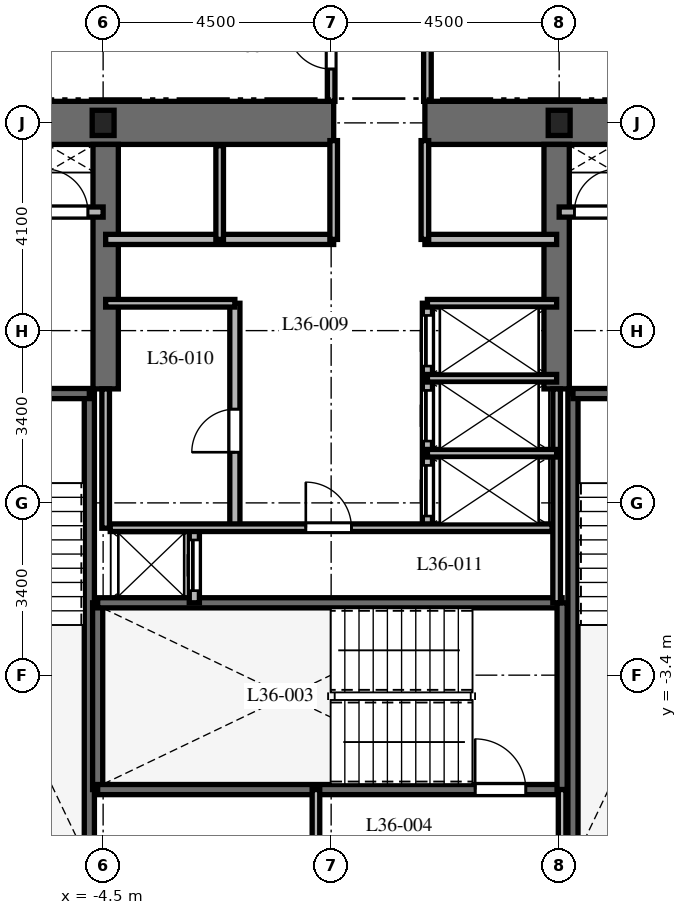
"""IFC4 building model, lengths in metres.
Left out: names, types, materials, properties, quantities, classifications, styles, units other than length and angle.
Written with IfcOpenShell. Run it as: python <this file> out.ifc"""

import sys

from ifc_helpers import new_model, si_unit, direction, frame, frame_2d, origin, origin_2d, place, context, subcontext, project, spatial, rectangle, i_section, extrude, element, fill, save


model = new_model("IFC4")
c1 = context("Model", 3, precision=1e-05, world=origin(), true_north=direction((0.0, 1.0)))
c2 = subcontext(c1, "Body", "Model", "MODEL_VIEW")
j1 = project(units=[si_unit("LENGTHUNIT", "METRE"), si_unit("PLANEANGLEUNIT", "RADIAN")], contexts=[c1])
p1 = place(None, origin())
s1 = spatial("IfcSite", under=j1, at=p1, CompositionType="ELEMENT")
p2 = place(p1, origin())
s2 = spatial("IfcBuilding", under=s1, at=p2, CompositionType="ELEMENT")
p3 = place(p2, frame((0.0, 0.0, 148.0)))
s3 = spatial("IfcBuildingStorey", under=s2, at=p3, CompositionType="ELEMENT", Elevation=148.0)
p4 = place(p3, frame((-9.425, 7.5, 0.0), z_axis=(0.0, 0.0, 1.0), x_axis=(1.0, 0.0, 0.0)))
e1 = element("IfcWall", 1, at=p4, inside=s3, PredefinedType="SHEAR", context=c2, shape_type="SweptSolid", body=[
    extrude(rectangle(XDim=9.475, YDim=0.85, at=frame_2d((4.738, 0.0))), origin(), (0.0, 0.0, 1.0), 3.7),
])
p5 = place(p3, frame((1.85, 7.5, 0.0), z_axis=(0.0, 0.0, 1.0), x_axis=(1.0, 0.0, 0.0)))
e2 = element("IfcWall", 2, at=p5, inside=s3, PredefinedType="SHEAR", context=c2, shape_type="SweptSolid", body=[
    extrude(rectangle(XDim=7.575, YDim=0.85, at=frame_2d((3.788, 0.0))), origin(), (0.0, 0.0, 1.0), 3.7),
])
for number, where, z_axis, x_axis in (
    (3, (-4.45, 2.25, 0.0), (0.0, 0.0, 1.0), (0.0, 1.0, 0.0)),
    (4, (4.45, 2.25, 0.0), (0.0, 0.0, 1.0), (0.0, 1.0, 0.0)),
):
    element("IfcWall", number, at=place(p3, frame(where, z_axis=z_axis, x_axis=x_axis)), inside=s3, PredefinedType="SHEAR", context=c2, shape_type="SweptSolid", body=[
        extrude(rectangle(XDim=4.825, YDim=0.5, at=frame_2d((2.413, 0.0))), origin(), (0.0, 0.0, 1.0), 3.7),
    ])
p6 = place(p3, frame((-4.772, -6.985, 0.0), z_axis=(0.0, 0.0, 1.0), x_axis=(0.0, 1.0, 0.0)))
e5 = element("IfcWall", 5, at=p6, inside=s3, PredefinedType="SHEAR", context=c2, shape_type="SweptSolid", body=[
    extrude(rectangle(XDim=9.143, YDim=0.2, at=frame_2d((4.572, 0.0))), origin(), (0.0, 0.0, 1.0), 3.7),
])
p7 = place(p3, frame((-8.458, 2.158, 0.0), z_axis=(0.0, 0.0, 1.0), x_axis=(1.0, 0.0, 0.0)))
e6 = element("IfcWall", 6, at=p7, inside=s3, PredefinedType="SHEAR", context=c2, shape_type="SweptSolid", body=[
    extrude(rectangle(XDim=3.686, YDim=0.2, at=frame_2d((1.843, 0.0))), origin(), (0.0, 0.0, 1.0), 3.7),
])
p8 = place(p7, frame((1.3, 0.0, 0.0)))
e7 = element("IfcOpeningElement", 7, at=p8, cuts=e6, PredefinedType="OPENING", context=c2, shape_type="SweptSolid", body=[
    extrude(rectangle(XDim=1.0, YDim=2.15, at=frame_2d((0.5, 1.075))), frame((0.0, 0.11, 0.0), z_axis=(0.0, -1.0, 0.0), x_axis=(1.0, 0.0, 0.0)), (0.0, 0.0, 1.0), 0.22),
])
p9 = place(p3, frame((4.772, -6.985, 0.0), z_axis=(0.0, 0.0, 1.0), x_axis=(0.0, 1.0, 0.0)))
e8 = element("IfcWall", 8, at=p9, inside=s3, PredefinedType="SHEAR", context=c2, shape_type="SweptSolid", body=[
    extrude(rectangle(XDim=9.143, YDim=0.2, at=frame_2d((4.572, 0.0))), origin(), (0.0, 0.0, 1.0), 3.7),
])
p10 = place(p3, frame((4.772, 2.158, 0.0), z_axis=(0.0, 0.0, 1.0), x_axis=(1.0, 0.0, 0.0)))
e9 = element("IfcWall", 9, at=p10, inside=s3, PredefinedType="SHEAR", context=c2, shape_type="SweptSolid", body=[
    extrude(rectangle(XDim=3.686, YDim=0.2, at=frame_2d((1.843, 0.0))), origin(), (0.0, 0.0, 1.0), 3.7),
])
p11 = place(p10, frame((1.35, 0.0, 0.0)))
e10 = element("IfcOpeningElement", 10, at=p11, cuts=e9, PredefinedType="OPENING", context=c2, shape_type="SweptSolid", body=[
    extrude(rectangle(XDim=1.0, YDim=2.15, at=frame_2d((0.5, 1.075))), frame((0.0, 0.11, 0.0), z_axis=(0.0, -1.0, 0.0), x_axis=(1.0, 0.0, 0.0)), (0.0, 0.0, 1.0), 0.22),
])
p12 = place(p3, frame((-4.608, -5.658, 0.0), z_axis=(0.0, 0.0, 1.0), x_axis=(0.0, 1.0, 0.0)))
e11 = element("IfcWall", 11, at=p12, inside=s3, PredefinedType="SHEAR", context=c2, shape_type="SweptSolid", body=[
    extrude(rectangle(XDim=3.686, YDim=0.2, at=frame_2d((1.843, 0.0))), origin(), (0.0, 0.0, 1.0), 3.7),
])
p13 = place(p3, frame((-4.608, -5.658, 0.0), z_axis=(0.0, 0.0, 1.0), x_axis=(1.0, 0.0, 0.0)))
e12 = element("IfcWall", 12, at=p13, inside=s3, PredefinedType="SHEAR", context=c2, shape_type="SweptSolid", body=[
    extrude(rectangle(XDim=9.166, YDim=0.2, at=frame_2d((4.583, 0.0))), origin(), (0.0, 0.0, 1.0), 3.7),
])
p14 = place(p13, frame((7.45, 0.0, 0.0)))
e13 = element("IfcOpeningElement", 13, at=p14, cuts=e12, PredefinedType="OPENING", context=c2, shape_type="SweptSolid", body=[
    extrude(rectangle(XDim=1.0, YDim=2.15, at=frame_2d((0.5, 1.075))), frame((0.0, 0.11, 0.0), z_axis=(0.0, -1.0, 0.0), x_axis=(1.0, 0.0, 0.0)), (0.0, 0.0, 1.0), 0.22),
])
p15 = place(p3, frame((-4.608, -1.972, 0.0), z_axis=(0.0, 0.0, 1.0), x_axis=(1.0, 0.0, 0.0)))
e14 = element("IfcWall", 14, at=p15, inside=s3, PredefinedType="SHEAR", context=c2, shape_type="SweptSolid", body=[
    extrude(rectangle(XDim=9.166, YDim=0.2, at=frame_2d((4.583, 0.0))), origin(), (0.0, 0.0, 1.0), 3.7),
])
p16 = place(p3, frame((4.558, -5.658, 0.0), z_axis=(0.0, 0.0, 1.0), x_axis=(0.0, 1.0, 0.0)))
e15 = element("IfcWall", 15, at=p16, inside=s3, PredefinedType="SHEAR", context=c2, shape_type="SweptSolid", body=[
    extrude(rectangle(XDim=3.686, YDim=0.2, at=frame_2d((1.843, 0.0))), origin(), (0.0, 0.0, 1.0), 3.7),
])
for number, where, z_axis, x_axis in (
    (16, (4.5, 7.5, 0.0), (0.0, 0.0, 1.0), (1.0, 0.0, 0.0)),
    (17, (-4.5, 7.5, 0.0), (0.0, 0.0, 1.0), (1.0, 0.0, 0.0)),
):
    element("IfcColumn", number, at=place(p3, frame(where, z_axis=z_axis, x_axis=x_axis)), inside=s3, PredefinedType="COLUMN", context=c2, shape_type="SweptSolid", body=[
        extrude(i_section(OverallWidth=0.432, OverallDepth=0.498, WebThickness=0.056, FlangeThickness=0.089, at=origin_2d()), origin(), (0.0, 0.0, 1.0), 3.7),
    ])
for number, where, z_axis, x_axis in (
    (18, (-0.3, -7.02, 0.0), (0.0, 0.0, 1.0), (0.0, 1.0, 0.0)),
    (19, (4.558, -7.02, 0.0), (0.0, 0.0, 1.0), (0.0, 1.0, 0.0)),
):
    element("IfcWall", number, at=place(p3, frame(where, z_axis=z_axis, x_axis=x_axis)), inside=s3, PredefinedType="PARTITIONING", context=c2, shape_type="SweptSolid", body=[
        extrude(rectangle(XDim=1.362, YDim=0.15, at=frame_2d((0.681, 0.0))), origin(), (0.0, 0.0, 1.0), 3.4),
    ])
p17 = place(p3, frame((-8.55, 5.74, 0.0), z_axis=(0.0, 0.0, 1.0), x_axis=(1.0, 0.0, 0.0)))
e20 = element("IfcWall", 20, at=p17, inside=s3, PredefinedType="PARTITIONING", context=c2, shape_type="SweptSolid", body=[
    extrude(rectangle(XDim=4.05, YDim=0.2, at=frame_2d((2.025, 0.0))), origin(), (0.0, 0.0, 1.0), 3.4),
])
p18 = place(p17, frame((0.75, 0.0, 0.0)))
e21 = element("IfcOpeningElement", 21, at=p18, cuts=e20, PredefinedType="OPENING", context=c2, shape_type="SweptSolid", body=[
    extrude(rectangle(XDim=1.1, YDim=2.2, at=frame_2d((0.55, 1.1))), frame((0.0, 0.11, 0.0), z_axis=(0.0, -1.0, 0.0), x_axis=(1.0, 0.0, 0.0)), (0.0, 0.0, 1.0), 0.22),
])
p19 = place(p17, frame((2.9, 0.0, 0.0)))
e22 = element("IfcOpeningElement", 22, at=p19, cuts=e20, PredefinedType="OPENING", context=c2, shape_type="SweptSolid", body=[
    extrude(rectangle(XDim=0.85, YDim=2.03, at=frame_2d((0.425, 1.015))), frame((0.0, 0.11, 0.0), z_axis=(0.0, -1.0, 0.0), x_axis=(1.0, 0.0, 0.0)), (0.0, 0.0, 1.0), 0.22),
])
p20 = place(p3, frame((4.5, 5.74, 0.0), z_axis=(0.0, 0.0, 1.0), x_axis=(1.0, 0.0, 0.0)))
e23 = element("IfcWall", 23, at=p20, inside=s3, PredefinedType="PARTITIONING", context=c2, shape_type="SweptSolid", body=[
    extrude(rectangle(XDim=4.05, YDim=0.2, at=frame_2d((2.025, 0.0))), origin(), (0.0, 0.0, 1.0), 3.4),
])
p21 = place(p20, frame((0.3, 0.0, 0.0)))
e24 = element("IfcOpeningElement", 24, at=p21, cuts=e23, PredefinedType="OPENING", context=c2, shape_type="SweptSolid", body=[
    extrude(rectangle(XDim=0.85, YDim=2.03, at=frame_2d((0.425, 1.015))), frame((0.0, 0.11, 0.0), z_axis=(0.0, -1.0, 0.0), x_axis=(1.0, 0.0, 0.0)), (0.0, 0.0, 1.0), 0.22),
])
p22 = place(p20, frame((2.15, 0.0, 0.0)))
e25 = element("IfcOpeningElement", 25, at=p22, cuts=e23, PredefinedType="OPENING", context=c2, shape_type="SweptSolid", body=[
    extrude(rectangle(XDim=1.1, YDim=2.2, at=frame_2d((0.55, 1.1))), frame((0.0, 0.11, 0.0), z_axis=(0.0, -1.0, 0.0), x_axis=(1.0, 0.0, 0.0)), (0.0, 0.0, 1.0), 0.22),
])
p23 = place(p3, frame((-2.7, -1.972, 0.0), z_axis=(0.0, 0.0, 1.0), x_axis=(0.0, 1.0, 0.0)))
e26 = element("IfcWall", 26, at=p23, inside=s3, PredefinedType="PARTITIONING", context=c2, shape_type="SweptSolid", body=[
    extrude(rectangle(XDim=1.472, YDim=0.2, at=frame_2d((0.736, 0.0))), origin(), (0.0, 0.0, 1.0), 3.4),
])
p24 = place(p23, frame((0.24, 0.0, 0.0)))
e27 = element("IfcOpeningElement", 27, at=p24, cuts=e26, PredefinedType="OPENING", context=c2, shape_type="SweptSolid", body=[
    extrude(rectangle(XDim=1.0, YDim=2.2, at=frame_2d((0.5, 1.1))), frame((0.0, 0.11, 0.0), z_axis=(0.0, -1.0, 0.0), x_axis=(1.0, 0.0, 0.0)), (0.0, 0.0, 1.0), 0.22),
])
p25 = place(p3, frame((-4.45, 5.2, 0.0), z_axis=(0.0, 0.0, 1.0), x_axis=(1.0, 0.0, 0.0)))
e28 = element("IfcWall", 28, at=p25, inside=s3, PredefinedType="PARTITIONING", context=c2, shape_type="SweptSolid", body=[
    extrude(rectangle(XDim=4.5, YDim=0.2, at=frame_2d((2.25, 0.0))), origin(), (0.0, 0.0, 1.0), 3.4),
])
p26 = place(p3, frame((1.85, 5.2, 0.0), z_axis=(0.0, 0.0, 1.0), x_axis=(1.0, 0.0, 0.0)))
e29 = element("IfcWall", 29, at=p26, inside=s3, PredefinedType="PARTITIONING", context=c2, shape_type="SweptSolid", body=[
    extrude(rectangle(XDim=2.6, YDim=0.2, at=frame_2d((1.3, 0.0))), origin(), (0.0, 0.0, 1.0), 3.4),
])
p27 = place(p3, frame((-2.2, 5.2, 0.0), z_axis=(0.0, 0.0, 1.0), x_axis=(0.0, 1.0, 0.0)))
e30 = element("IfcWall", 30, at=p27, inside=s3, PredefinedType="PARTITIONING", context=c2, shape_type="SweptSolid", body=[
    extrude(rectangle(XDim=1.85, YDim=0.15, at=frame_2d((0.925, 0.0))), origin(), (0.0, 0.0, 1.0), 3.4),
])
for number, where, z_axis, x_axis in (
    (31, (0.05, 5.2, 0.0), (0.0, 0.0, 1.0), (0.0, 1.0, 0.0)),
    (32, (1.85, 5.2, 0.0), (0.0, 0.0, 1.0), (0.0, 1.0, 0.0)),
):
    element("IfcWall", number, at=place(p3, frame(where, z_axis=z_axis, x_axis=x_axis)), inside=s3, PredefinedType="PARTITIONING", context=c2, shape_type="SweptSolid", body=[
        extrude(rectangle(XDim=1.95, YDim=0.15, at=frame_2d((0.975, 0.0))), origin(), (0.0, 0.0, 1.0), 3.4),
    ])
p28 = place(p3, frame((-4.45, -0.5, 0.0), z_axis=(0.0, 0.0, 1.0), x_axis=(0.0, 1.0, 0.0)))
e33 = element("IfcWall", 33, at=p28, inside=s3, PredefinedType="PARTITIONING", context=c2, shape_type="SweptSolid", body=[
    extrude(rectangle(XDim=2.75, YDim=0.15, at=frame_2d((1.375, 0.0))), origin(), (0.0, 0.0, 1.0), 3.4),
])
p29 = place(p3, frame((4.45, -1.972, 0.0), z_axis=(0.0, 0.0, 1.0), x_axis=(0.0, 1.0, 0.0)))
e34 = element("IfcWall", 34, at=p29, inside=s3, PredefinedType="PARTITIONING", context=c2, shape_type="SweptSolid", body=[
    extrude(rectangle(XDim=4.222, YDim=0.15, at=frame_2d((2.111, 0.0))), origin(), (0.0, 0.0, 1.0), 3.4),
])
p30 = place(p3, frame((-1.9, -0.5, 0.0), z_axis=(0.0, 0.0, 1.0), x_axis=(0.0, 1.0, 0.0)))
e35 = element("IfcWall", 35, at=p30, inside=s3, PredefinedType="PARTITIONING", context=c2, shape_type="SweptSolid", body=[
    extrude(rectangle(XDim=4.44, YDim=0.2, at=frame_2d((2.22, 0.0))), origin(), (0.0, 0.0, 1.0), 3.4),
])
p31 = place(p30, frame((1.5, 0.0, 0.0)))
e36 = element("IfcOpeningElement", 36, at=p31, cuts=e35, PredefinedType="OPENING", context=c2, shape_type="SweptSolid", body=[
    extrude(rectangle(XDim=0.85, YDim=2.03, at=frame_2d((0.425, 1.015))), frame((0.0, 0.11, 0.0), z_axis=(0.0, -1.0, 0.0), x_axis=(1.0, 0.0, 0.0)), (0.0, 0.0, 1.0), 0.22),
])
p32 = place(p3, frame((-4.45, 3.94, 0.0), z_axis=(0.0, 0.0, 1.0), x_axis=(1.0, 0.0, 0.0)))
e37 = element("IfcWall", 37, at=p32, inside=s3, PredefinedType="PARTITIONING", context=c2, shape_type="SweptSolid", body=[
    extrude(rectangle(XDim=2.55, YDim=0.15, at=frame_2d((1.275, 0.0))), origin(), (0.0, 0.0, 1.0), 3.4),
])
p33 = place(p3, frame((1.9, -0.5, 0.0), z_axis=(0.0, 0.0, 1.0), x_axis=(0.0, 1.0, 0.0)))
e38 = element("IfcWall", 38, at=p33, inside=s3, PredefinedType="PARTITIONING", context=c2, shape_type="SweptSolid", body=[
    extrude(rectangle(XDim=4.44, YDim=0.2, at=frame_2d((2.22, 0.0))), origin(), (0.0, 0.0, 1.0), 3.4),
])
p34 = place(p33, frame((0.24, 0.0, 0.0)))
e39 = element("IfcOpeningElement", 39, at=p34, cuts=e38, PredefinedType="OPENING", context=c2, shape_type="SweptSolid", body=[
    extrude(rectangle(XDim=1.0, YDim=2.2, at=frame_2d((0.5, 1.1))), frame((0.0, 0.11, 0.0), z_axis=(0.0, -1.0, 0.0), x_axis=(1.0, 0.0, 0.0)), (0.0, 0.0, 1.0), 0.22),
])
p35 = place(p33, frame((1.72, 0.0, 0.0)))
e40 = element("IfcOpeningElement", 40, at=p35, cuts=e38, PredefinedType="OPENING", context=c2, shape_type="SweptSolid", body=[
    extrude(rectangle(XDim=1.0, YDim=2.2, at=frame_2d((0.5, 1.1))), frame((0.0, 0.11, 0.0), z_axis=(0.0, -1.0, 0.0), x_axis=(1.0, 0.0, 0.0)), (0.0, 0.0, 1.0), 0.22),
])
p36 = place(p33, frame((3.2, 0.0, 0.0)))
e41 = element("IfcOpeningElement", 41, at=p36, cuts=e38, PredefinedType="OPENING", context=c2, shape_type="SweptSolid", body=[
    extrude(rectangle(XDim=1.0, YDim=2.2, at=frame_2d((0.5, 1.1))), frame((0.0, 0.11, 0.0), z_axis=(0.0, -1.0, 0.0), x_axis=(1.0, 0.0, 0.0)), (0.0, 0.0, 1.0), 0.22),
])
for number, where, z_axis, x_axis in (
    (42, (1.9, 3.94, 0.0), (0.0, 0.0, 1.0), (1.0, 0.0, 0.0)),
    (43, (1.9, 0.98, 0.0), (0.0, 0.0, 1.0), (1.0, 0.0, 0.0)),
    (44, (1.9, 2.46, 0.0), (0.0, 0.0, 1.0), (1.0, 0.0, 0.0)),
):
    element("IfcWall", number, at=place(p3, frame(where, z_axis=z_axis, x_axis=x_axis)), inside=s3, PredefinedType="PARTITIONING", context=c2, shape_type="SweptSolid", body=[
        extrude(rectangle(XDim=2.55, YDim=0.15, at=frame_2d((1.275, 0.0))), origin(), (0.0, 0.0, 1.0), 3.4),
    ])
p37 = place(p3, frame((-4.36, -0.49, 0.0), z_axis=(0.0, 0.0, 1.0), x_axis=(1.0, 0.0, 0.0)))
e45 = element("IfcWall", 45, at=p37, inside=s3, PredefinedType="PARTITIONING", context=c2, shape_type="SweptSolid", body=[
    extrude(rectangle(XDim=8.72, YDim=0.15, at=frame_2d((4.36, 0.0))), origin(), (0.0, 0.0, 1.0), 3.4),
])
p38 = place(p37, frame((3.86, 0.0, 0.0)))
e46 = element("IfcOpeningElement", 46, at=p38, cuts=e45, PredefinedType="OPENING", context=c2, shape_type="SweptSolid", body=[
    extrude(rectangle(XDim=0.9, YDim=2.03, at=frame_2d((0.45, 1.015))), frame((0.0, 0.085, 0.0), z_axis=(0.0, -1.0, 0.0), x_axis=(1.0, 0.0, 0.0)), (0.0, 0.0, 1.0), 0.17),
])
p39 = place(p3, frame((1.9, 10.05, 0.0), z_axis=(0.0, 0.0, 1.0), x_axis=(0.0, -1.0, 0.0)))
e47 = element("IfcWall", 47, at=p39, inside=s3, PredefinedType="PARTITIONING", context=c2, shape_type="SweptSolid", body=[
    extrude(rectangle(XDim=2.125, YDim=0.15, at=frame_2d((1.062, 0.0))), origin(), (0.0, 0.0, 1.0), 3.4),
])
p40 = place(p3, frame((0.0, 7.925, 0.0), z_axis=(0.0, 0.0, 1.0), x_axis=(0.0, 1.0, 0.0)))
e48 = element("IfcWall", 48, at=p40, inside=s3, PredefinedType="PARTITIONING", context=c2, shape_type="SweptSolid", body=[
    extrude(rectangle(XDim=2.125, YDim=0.15, at=frame_2d((1.062, 0.0))), origin(), (0.0, 0.0, 1.0), 3.4),
])
p41 = place(p40, frame((0.638, 0.0, 0.0)))
e49 = element("IfcOpeningElement", 49, at=p41, cuts=e48, PredefinedType="OPENING", context=c2, shape_type="SweptSolid", body=[
    extrude(rectangle(XDim=0.85, YDim=2.03, at=frame_2d((0.425, 1.015))), frame((0.0, 0.085, 0.0), z_axis=(0.0, -1.0, 0.0), x_axis=(1.0, 0.0, 0.0)), (0.0, 0.0, 1.0), 0.17),
])
p42 = place(p14, origin())
e50 = element("IfcDoor", 50, at=p42, inside=s3, OperationType="SINGLE_SWING_LEFT", PredefinedType="DOOR", context=c2, shape_type="SweptSolid", body=[
    extrude(rectangle(XDim=1.0, YDim=2.15, at=frame_2d((0.5, 1.075))), frame((0.0, 0.025, 0.0), z_axis=(0.0, -1.0, 0.0), x_axis=(1.0, 0.0, 0.0)), (0.0, 0.0, 1.0), 0.05),
])
fill(e13, e50)
p43 = place(p19, origin())
e51 = element("IfcDoor", 51, at=p43, inside=s3, OperationType="SINGLE_SWING_LEFT", PredefinedType="DOOR", context=c2, shape_type="SweptSolid", body=[
    extrude(rectangle(XDim=0.85, YDim=2.03, at=frame_2d((0.425, 1.015))), frame((0.0, 0.025, 0.0), z_axis=(0.0, -1.0, 0.0), x_axis=(1.0, 0.0, 0.0)), (0.0, 0.0, 1.0), 0.05),
])
fill(e22, e51)
p44 = place(p21, origin())
e52 = element("IfcDoor", 52, at=p44, inside=s3, OperationType="SINGLE_SWING_RIGHT", PredefinedType="DOOR", context=c2, shape_type="SweptSolid", body=[
    extrude(rectangle(XDim=0.85, YDim=2.03, at=frame_2d((0.425, 1.015))), frame((0.0, 0.025, 0.0), z_axis=(0.0, -1.0, 0.0), x_axis=(1.0, 0.0, 0.0)), (0.0, 0.0, 1.0), 0.05),
])
fill(e24, e52)
p45 = place(p24, origin())
e53 = element("IfcDoor", 53, at=p45, inside=s3, OperationType="SLIDING_TO_LEFT", PredefinedType="DOOR", context=c2, shape_type="SweptSolid", body=[
    extrude(rectangle(XDim=1.0, YDim=2.2, at=frame_2d((0.5, 1.1))), frame((0.0, 0.025, 0.0), z_axis=(0.0, -1.0, 0.0), x_axis=(1.0, 0.0, 0.0)), (0.0, 0.0, 1.0), 0.05),
])
fill(e27, e53)
p46 = place(p31, origin())
e54 = element("IfcDoor", 54, at=p46, inside=s3, OperationType="SINGLE_SWING_LEFT", PredefinedType="DOOR", context=c2, shape_type="SweptSolid", body=[
    extrude(rectangle(XDim=0.85, YDim=2.03, at=frame_2d((0.425, 1.015))), frame((0.0, 0.025, 0.0), z_axis=(0.0, -1.0, 0.0), x_axis=(1.0, 0.0, 0.0)), (0.0, 0.0, 1.0), 0.05),
])
fill(e36, e54)
p47 = place(p34, origin())
e55 = element("IfcDoor", 55, at=p47, inside=s3, OperationType="SLIDING_TO_RIGHT", PredefinedType="DOOR", context=c2, shape_type="SweptSolid", body=[
    extrude(rectangle(XDim=1.0, YDim=2.2, at=frame_2d((0.5, 1.1))), frame((0.0, 0.025, 0.0), z_axis=(0.0, -1.0, 0.0), x_axis=(1.0, 0.0, 0.0)), (0.0, 0.0, 1.0), 0.05),
])
fill(e39, e55)
p48 = place(p35, origin())
e56 = element("IfcDoor", 56, at=p48, inside=s3, OperationType="SLIDING_TO_RIGHT", PredefinedType="DOOR", context=c2, shape_type="SweptSolid", body=[
    extrude(rectangle(XDim=1.0, YDim=2.2, at=frame_2d((0.5, 1.1))), frame((0.0, 0.025, 0.0), z_axis=(0.0, -1.0, 0.0), x_axis=(1.0, 0.0, 0.0)), (0.0, 0.0, 1.0), 0.05),
])
fill(e40, e56)
p49 = place(p36, origin())
e57 = element("IfcDoor", 57, at=p49, inside=s3, OperationType="SLIDING_TO_RIGHT", PredefinedType="DOOR", context=c2, shape_type="SweptSolid", body=[
    extrude(rectangle(XDim=1.0, YDim=2.2, at=frame_2d((0.5, 1.1))), frame((0.0, 0.025, 0.0), z_axis=(0.0, -1.0, 0.0), x_axis=(1.0, 0.0, 0.0)), (0.0, 0.0, 1.0), 0.05),
])
fill(e41, e57)
p50 = place(p38, origin())
e58 = element("IfcDoor", 58, at=p50, inside=s3, OperationType="SINGLE_SWING_LEFT", PredefinedType="DOOR", context=c2, shape_type="SweptSolid", body=[
    extrude(rectangle(XDim=0.9, YDim=2.03, at=frame_2d((0.45, 1.015))), frame((0.0, 0.025, 0.0), z_axis=(0.0, -1.0, 0.0), x_axis=(1.0, 0.0, 0.0)), (0.0, 0.0, 1.0), 0.05),
])
fill(e46, e58)
p51 = place(p41, origin())
e59 = element("IfcDoor", 59, at=p51, inside=s3, OperationType="SINGLE_SWING_RIGHT", PredefinedType="DOOR", context=c2, shape_type="SweptSolid", body=[
    extrude(rectangle(XDim=0.85, YDim=2.03, at=frame_2d((0.425, 1.015))), frame((0.0, 0.025, 0.0), z_axis=(0.0, -1.0, 0.0), x_axis=(1.0, 0.0, 0.0)), (0.0, 0.0, 1.0), 0.05),
])
fill(e49, e59)
save(model, sys.argv[1])
